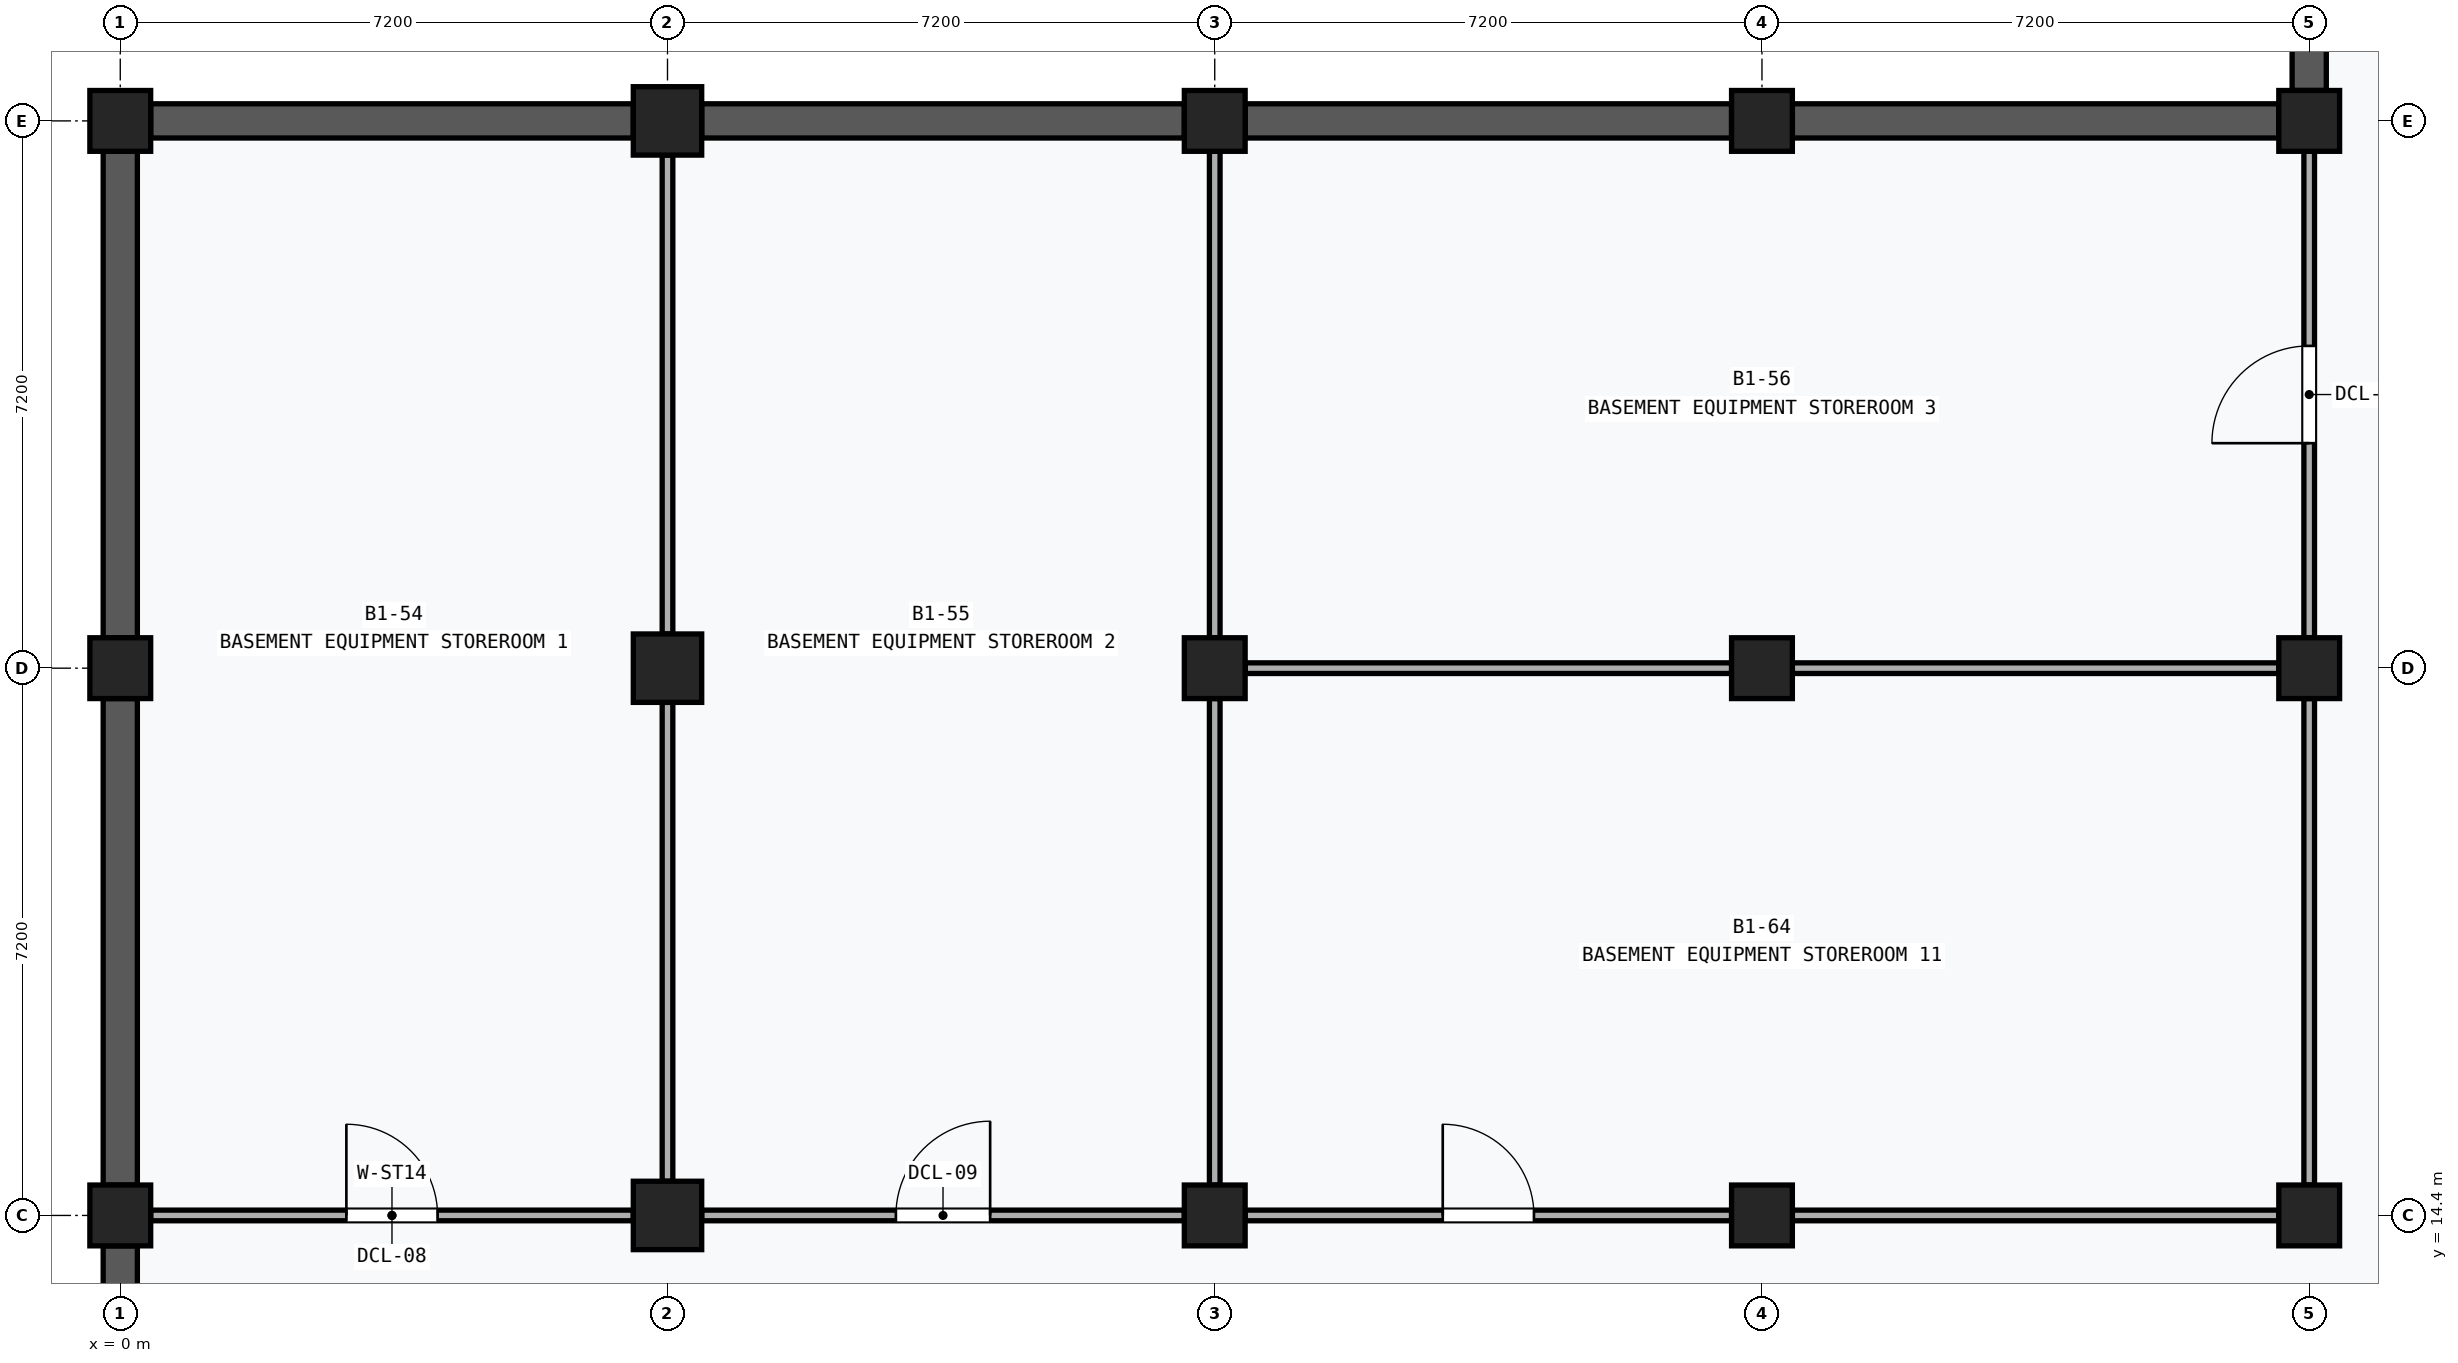
"""IFC4 building model, lengths in metres.
Left out: names, types, materials, properties, quantities, classifications, styles, units other than length and angle.
Written with IfcOpenShell. Run it as: python <this file> out.ifc"""

import sys

from ifc_helpers import new_model, si_unit, direction, frame, frame_2d, origin, origin_2d, place, context, subcontext, project, spatial, rectangle, extrude, element, fill, save


model = new_model("IFC4")
c1 = context("Model", 3, precision=1e-05, world=origin(), true_north=direction((0.0, 1.0)))
c2 = subcontext(c1, "Body", "Model", "MODEL_VIEW")
j1 = project(units=[si_unit("LENGTHUNIT", "METRE"), si_unit("PLANEANGLEUNIT", "RADIAN")], contexts=[c1])
p1 = place(None, origin())
s1 = spatial("IfcSite", under=j1, at=p1, CompositionType="ELEMENT")
p2 = place(p1, origin())
s2 = spatial("IfcBuilding", under=s1, at=p2, CompositionType="ELEMENT")
p3 = place(p2, frame((0.0, 0.0, -4.5)))
s3 = spatial("IfcBuildingStorey", under=s2, at=p3, CompositionType="ELEMENT", Elevation=-4.5)
for number, where, z_axis, x_axis in (
    (1, (0.0, 14.4, 0.0), (0.0, 0.0, 1.0), (1.0, 0.0, 0.0)),
    (2, (0.0, 21.6, 0.0), (0.0, 0.0, 1.0), (1.0, 0.0, 0.0)),
    (3, (0.0, 28.8, 0.0), (0.0, 0.0, 1.0), (1.0, 0.0, 0.0)),
):
    element("IfcColumn", number, at=place(p3, frame(where, z_axis=z_axis, x_axis=x_axis)), inside=s3, PredefinedType="COLUMN", context=c2, shape_type="SweptSolid", body=[
        extrude(rectangle(XDim=0.8, YDim=0.8, at=origin_2d()), origin(), (0.0, 0.0, 1.0), 4.5),
    ])
for number, where, z_axis, x_axis in (
    (4, (7.2, 14.4, 0.0), (0.0, 0.0, 1.0), (1.0, 0.0, 0.0)),
    (5, (7.2, 21.6, 0.0), (0.0, 0.0, 1.0), (1.0, 0.0, 0.0)),
    (6, (7.2, 28.8, 0.0), (0.0, 0.0, 1.0), (1.0, 0.0, 0.0)),
):
    element("IfcColumn", number, at=place(p3, frame(where, z_axis=z_axis, x_axis=x_axis)), inside=s3, PredefinedType="COLUMN", context=c2, shape_type="SweptSolid", body=[
        extrude(rectangle(XDim=0.9, YDim=0.9, at=origin_2d()), origin(), (0.0, 0.0, 1.0), 4.5),
    ])
for number, where, z_axis, x_axis in (
    (7, (14.4, 14.4, 0.0), (0.0, 0.0, 1.0), (1.0, 0.0, 0.0)),
    (8, (14.4, 21.6, 0.0), (0.0, 0.0, 1.0), (1.0, 0.0, 0.0)),
    (9, (14.4, 28.8, 0.0), (0.0, 0.0, 1.0), (1.0, 0.0, 0.0)),
    (10, (21.6, 14.4, 0.0), (0.0, 0.0, 1.0), (1.0, 0.0, 0.0)),
    (11, (21.6, 21.6, 0.0), (0.0, 0.0, 1.0), (1.0, 0.0, 0.0)),
    (12, (21.6, 28.8, 0.0), (0.0, 0.0, 1.0), (1.0, 0.0, 0.0)),
    (13, (28.8, 14.4, 0.0), (0.0, 0.0, 1.0), (1.0, 0.0, 0.0)),
    (14, (28.8, 21.6, 0.0), (0.0, 0.0, 1.0), (1.0, 0.0, 0.0)),
    (15, (28.8, 28.8, 0.0), (0.0, 0.0, 1.0), (1.0, 0.0, 0.0)),
):
    element("IfcColumn", number, at=place(p3, frame(where, z_axis=z_axis, x_axis=x_axis)), inside=s3, PredefinedType="COLUMN", context=c2, shape_type="SweptSolid", body=[
        extrude(rectangle(XDim=0.8, YDim=0.8, at=origin_2d()), origin(), (0.0, 0.0, 1.0), 4.5),
    ])
for number, where, z_axis, x_axis in (
    (16, (0.0, 7.6, 0.0), (0.0, 0.0, 1.0), (0.0, 1.0, 0.0)),
    (17, (0.0, 14.8, 0.0), (0.0, 0.0, 1.0), (0.0, 1.0, 0.0)),
):
    element("IfcWall", number, at=place(p3, frame(where, z_axis=z_axis, x_axis=x_axis)), inside=s3, PredefinedType="SOLIDWALL", context=c2, shape_type="SweptSolid", body=[
        extrude(rectangle(XDim=6.4, YDim=0.45, at=frame_2d((3.2, 0.0))), origin(), (0.0, 0.0, 1.0), 3.57),
    ])
p4 = place(p3, frame((0.4, 28.8, 0.0), z_axis=(0.0, 0.0, 1.0), x_axis=(1.0, 0.0, 0.0)))
e18 = element("IfcWall", 18, at=p4, inside=s3, PredefinedType="SOLIDWALL", context=c2, shape_type="SweptSolid", body=[
    extrude(rectangle(XDim=6.35, YDim=0.45, at=frame_2d((3.175, 0.0))), origin(), (0.0, 0.0, 1.0), 3.57),
])
p5 = place(p3, frame((0.0, 22.0, 0.0), z_axis=(0.0, 0.0, 1.0), x_axis=(0.0, 1.0, 0.0)))
e19 = element("IfcWall", 19, at=p5, inside=s3, PredefinedType="SOLIDWALL", context=c2, shape_type="SweptSolid", body=[
    extrude(rectangle(XDim=6.4, YDim=0.45, at=frame_2d((3.2, 0.0))), origin(), (0.0, 0.0, 1.0), 3.57),
])
p6 = place(p3, frame((7.65, 28.8, 0.0), z_axis=(0.0, 0.0, 1.0), x_axis=(1.0, 0.0, 0.0)))
e20 = element("IfcWall", 20, at=p6, inside=s3, PredefinedType="SOLIDWALL", context=c2, shape_type="SweptSolid", body=[
    extrude(rectangle(XDim=6.35, YDim=0.45, at=frame_2d((3.175, 0.0))), origin(), (0.0, 0.0, 1.0), 3.57),
])
for number, where, z_axis, x_axis in (
    (21, (14.8, 28.8, 0.0), (0.0, 0.0, 1.0), (1.0, 0.0, 0.0)),
    (22, (22.0, 28.8, 0.0), (0.0, 0.0, 1.0), (1.0, 0.0, 0.0)),
):
    element("IfcWall", number, at=place(p3, frame(where, z_axis=z_axis, x_axis=x_axis)), inside=s3, PredefinedType="SOLIDWALL", context=c2, shape_type="SweptSolid", body=[
        extrude(rectangle(XDim=6.4, YDim=0.45, at=frame_2d((3.2, 0.0))), origin(), (0.0, 0.0, 1.0), 3.57),
    ])
p7 = place(p3, frame((28.8, 29.2, 0.0), z_axis=(0.0, 0.0, 1.0), x_axis=(0.0, 1.0, 0.0)))
e23 = element("IfcWall", 23, at=p7, inside=s3, PredefinedType="SOLIDWALL", context=c2, shape_type="SweptSolid", body=[
    extrude(rectangle(XDim=6.4, YDim=0.45, at=frame_2d((3.2, 0.0))), origin(), (0.0, 0.0, 1.0), 3.57),
])
p8 = place(p3, frame((0.4, 14.4, 0.0), z_axis=(0.0, 0.0, 1.0), x_axis=(1.0, 0.0, 0.0)))
e24 = element("IfcWall", 24, at=p8, inside=s3, PredefinedType="PARTITIONING", context=c2, shape_type="SweptSolid", body=[
    extrude(rectangle(XDim=6.35, YDim=0.14, at=frame_2d((3.175, 0.0))), origin(), (0.0, 0.0, 1.0), 3.3),
])
p9 = place(p8, frame((2.575, 0.0, 0.0)))
e25 = element("IfcOpeningElement", 25, at=p9, cuts=e24, PredefinedType="OPENING", context=c2, shape_type="SweptSolid", body=[
    extrude(rectangle(XDim=1.2, YDim=2.24, at=frame_2d((0.6, 1.12))), frame((0.0, 0.082, 0.0), z_axis=(0.0, -1.0, 0.0), x_axis=(1.0, 0.0, 0.0)), (0.0, 0.0, 1.0), 0.164),
])
p10 = place(p3, frame((7.2, 14.85, 0.0), z_axis=(0.0, 0.0, 1.0), x_axis=(0.0, 1.0, 0.0)))
e26 = element("IfcWall", 26, at=p10, inside=s3, PredefinedType="PARTITIONING", context=c2, shape_type="SweptSolid", body=[
    extrude(rectangle(XDim=6.3, YDim=0.14, at=frame_2d((3.15, 0.0))), origin(), (0.0, 0.0, 1.0), 3.3),
])
p11 = place(p3, frame((7.2, 22.05, 0.0), z_axis=(0.0, 0.0, 1.0), x_axis=(0.0, 1.0, 0.0)))
e27 = element("IfcWall", 27, at=p11, inside=s3, PredefinedType="PARTITIONING", context=c2, shape_type="SweptSolid", body=[
    extrude(rectangle(XDim=6.3, YDim=0.14, at=frame_2d((3.15, 0.0))), origin(), (0.0, 0.0, 1.0), 3.3),
])
p12 = place(p3, frame((7.65, 14.4, 0.0), z_axis=(0.0, 0.0, 1.0), x_axis=(1.0, 0.0, 0.0)))
e28 = element("IfcWall", 28, at=p12, inside=s3, PredefinedType="PARTITIONING", context=c2, shape_type="SweptSolid", body=[
    extrude(rectangle(XDim=6.35, YDim=0.14, at=frame_2d((3.175, 0.0))), origin(), (0.0, 0.0, 1.0), 3.3),
])
p13 = place(p12, frame((2.555, 0.0, 0.0)))
e29 = element("IfcOpeningElement", 29, at=p13, cuts=e28, PredefinedType="OPENING", context=c2, shape_type="SweptSolid", body=[
    extrude(rectangle(XDim=1.24, YDim=2.26, at=frame_2d((0.62, 1.13))), frame((0.0, 0.082, 0.0), z_axis=(0.0, -1.0, 0.0), x_axis=(1.0, 0.0, 0.0)), (0.0, 0.0, 1.0), 0.164),
])
for number, where, z_axis, x_axis in (
    (30, (14.4, 14.8, 0.0), (0.0, 0.0, 1.0), (0.0, 1.0, 0.0)),
    (31, (14.4, 22.0, 0.0), (0.0, 0.0, 1.0), (0.0, 1.0, 0.0)),
    (32, (14.8, 21.6, 0.0), (0.0, 0.0, 1.0), (1.0, 0.0, 0.0)),
    (33, (22.0, 21.6, 0.0), (0.0, 0.0, 1.0), (1.0, 0.0, 0.0)),
):
    element("IfcWall", number, at=place(p3, frame(where, z_axis=z_axis, x_axis=x_axis)), inside=s3, PredefinedType="PARTITIONING", context=c2, shape_type="SweptSolid", body=[
        extrude(rectangle(XDim=6.4, YDim=0.14, at=frame_2d((3.2, 0.0))), origin(), (0.0, 0.0, 1.0), 3.3),
    ])
p14 = place(p3, frame((28.8, 22.0, 0.0), z_axis=(0.0, 0.0, 1.0), x_axis=(0.0, 1.0, 0.0)))
e34 = element("IfcWall", 34, at=p14, inside=s3, PredefinedType="PARTITIONING", context=c2, shape_type="SweptSolid", body=[
    extrude(rectangle(XDim=6.4, YDim=0.14, at=frame_2d((3.2, 0.0))), origin(), (0.0, 0.0, 1.0), 3.3),
])
p15 = place(p14, frame((2.56, 0.0, 0.0)))
e35 = element("IfcOpeningElement", 35, at=p15, cuts=e34, PredefinedType="OPENING", context=c2, shape_type="SweptSolid", body=[
    extrude(rectangle(XDim=1.28, YDim=2.28, at=frame_2d((0.64, 1.14))), frame((0.0, 0.082, 0.0), z_axis=(0.0, -1.0, 0.0), x_axis=(1.0, 0.0, 0.0)), (0.0, 0.0, 1.0), 0.164),
])
p16 = place(p3, frame((14.8, 14.4, 0.0), z_axis=(0.0, 0.0, 1.0), x_axis=(1.0, 0.0, 0.0)))
e36 = element("IfcWall", 36, at=p16, inside=s3, PredefinedType="PARTITIONING", context=c2, shape_type="SweptSolid", body=[
    extrude(rectangle(XDim=6.4, YDim=0.14, at=frame_2d((3.2, 0.0))), origin(), (0.0, 0.0, 1.0), 3.3),
])
p17 = place(p16, frame((2.6, 0.0, 0.0)))
e37 = element("IfcOpeningElement", 37, at=p17, cuts=e36, PredefinedType="OPENING", context=c2, shape_type="SweptSolid", body=[
    extrude(rectangle(XDim=1.2, YDim=2.24, at=frame_2d((0.6, 1.12))), frame((0.0, 0.082, 0.0), z_axis=(0.0, -1.0, 0.0), x_axis=(1.0, 0.0, 0.0)), (0.0, 0.0, 1.0), 0.164),
])
for number, where, z_axis, x_axis in (
    (38, (22.0, 14.4, 0.0), (0.0, 0.0, 1.0), (1.0, 0.0, 0.0)),
    (39, (28.8, 14.8, 0.0), (0.0, 0.0, 1.0), (0.0, 1.0, 0.0)),
):
    element("IfcWall", number, at=place(p3, frame(where, z_axis=z_axis, x_axis=x_axis)), inside=s3, PredefinedType="PARTITIONING", context=c2, shape_type="SweptSolid", body=[
        extrude(rectangle(XDim=6.4, YDim=0.14, at=frame_2d((3.2, 0.0))), origin(), (0.0, 0.0, 1.0), 3.3),
    ])
p18 = place(p9, origin())
e40 = element("IfcDoor", 40, at=p18, inside=s3, OperationType="SINGLE_SWING_LEFT", PredefinedType="DOOR", context=c2, shape_type="SweptSolid", body=[
    extrude(rectangle(XDim=1.2, YDim=2.24, at=frame_2d((0.6, 1.12))), frame((0.0, 0.025, 0.0), z_axis=(0.0, -1.0, 0.0), x_axis=(1.0, 0.0, 0.0)), (0.0, 0.0, 1.0), 0.05),
])
fill(e25, e40)
p19 = place(p13, origin())
e41 = element("IfcDoor", 41, at=p19, inside=s3, OperationType="SINGLE_SWING_RIGHT", PredefinedType="DOOR", context=c2, shape_type="SweptSolid", body=[
    extrude(rectangle(XDim=1.24, YDim=2.26, at=frame_2d((0.62, 1.13))), frame((0.0, 0.025, 0.0), z_axis=(0.0, -1.0, 0.0), x_axis=(1.0, 0.0, 0.0)), (0.0, 0.0, 1.0), 0.05),
])
fill(e29, e41)
p20 = place(p15, origin())
e42 = element("IfcDoor", 42, at=p20, inside=s3, OperationType="SINGLE_SWING_LEFT", PredefinedType="DOOR", context=c2, shape_type="SweptSolid", body=[
    extrude(rectangle(XDim=1.28, YDim=2.28, at=frame_2d((0.64, 1.14))), frame((0.0, 0.025, 0.0), z_axis=(0.0, -1.0, 0.0), x_axis=(1.0, 0.0, 0.0)), (0.0, 0.0, 1.0), 0.05),
])
fill(e35, e42)
p21 = place(p17, origin())
e43 = element("IfcDoor", 43, at=p21, inside=s3, OperationType="SINGLE_SWING_LEFT", PredefinedType="DOOR", context=c2, shape_type="SweptSolid", body=[
    extrude(rectangle(XDim=1.2, YDim=2.24, at=frame_2d((0.6, 1.12))), frame((0.0, 0.025, 0.0), z_axis=(0.0, -1.0, 0.0), x_axis=(1.0, 0.0, 0.0)), (0.0, 0.0, 1.0), 0.05),
])
fill(e37, e43)
save(model, sys.argv[1])
